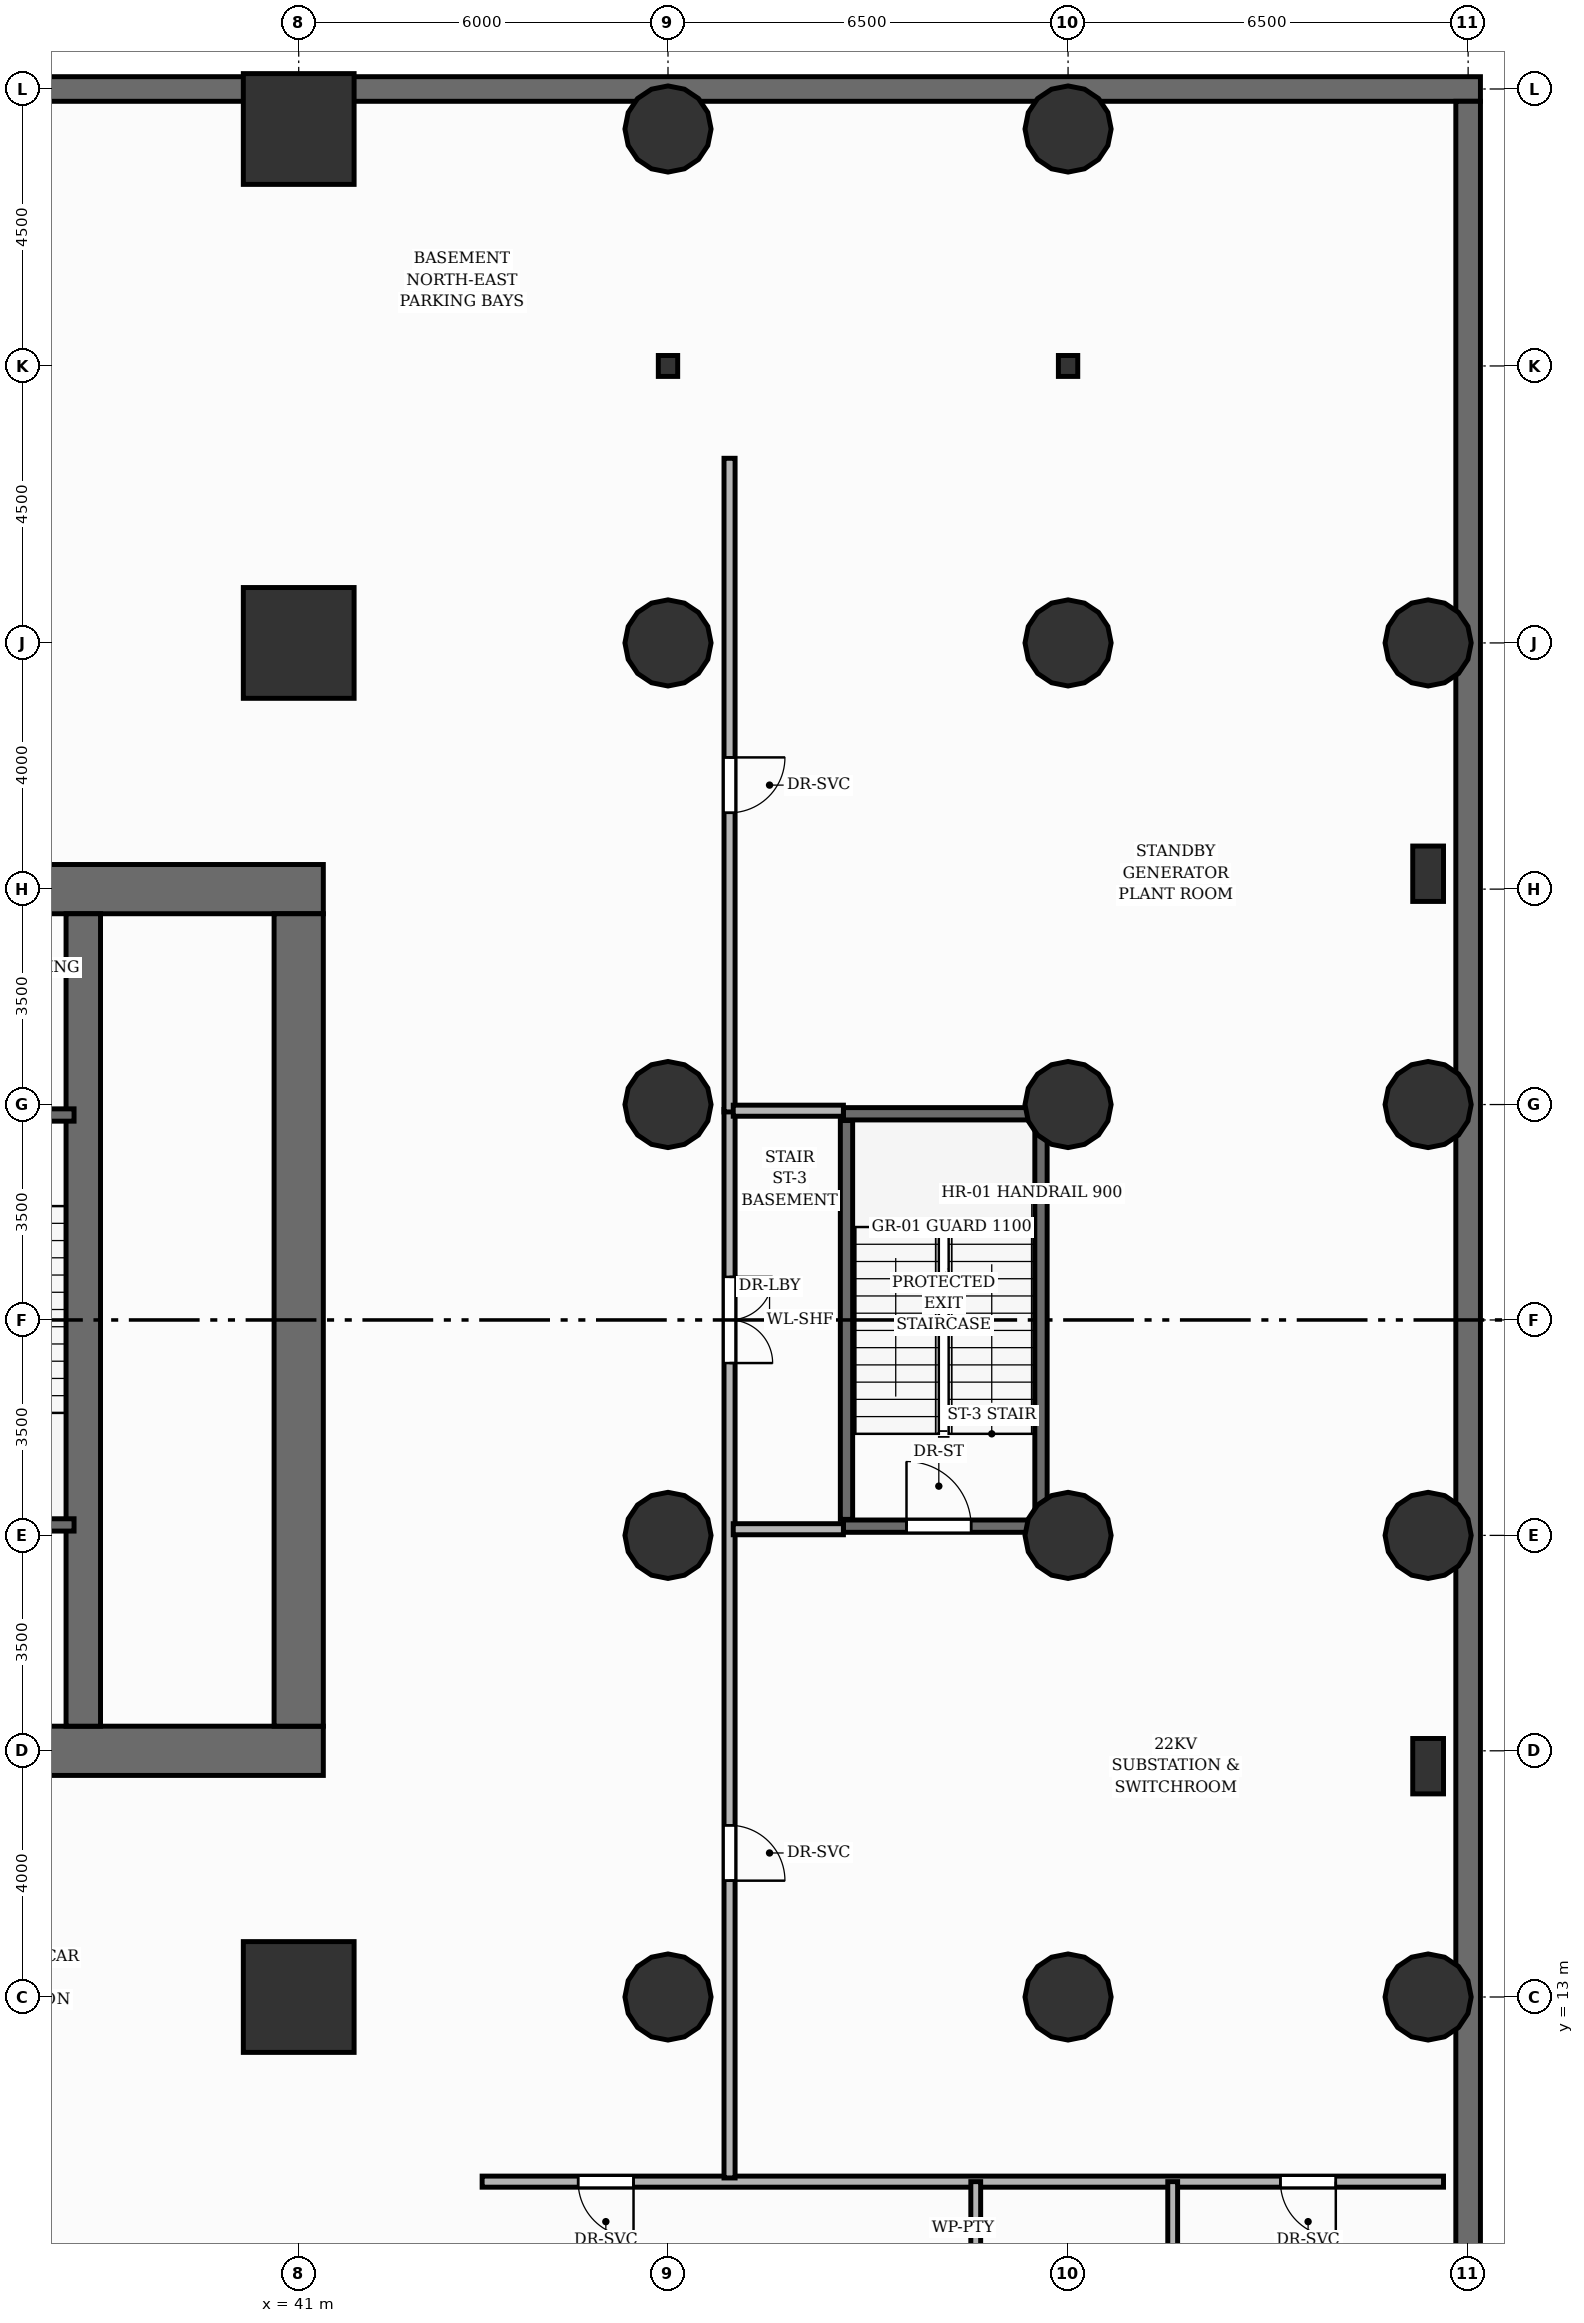
"""IFC4 building model, lengths in metres.
Left out: names, types, materials, properties, quantities, classifications, styles, units other than length and angle.
Written with IfcOpenShell. Run it as: python <this file> out.ifc"""

import sys

from ifc_helpers import new_model, si_unit, direction, frame, frame_2d, origin, origin_2d, place, context, subcontext, project, spatial, rectangle, circle, i_section, extrude, element, fill, save


model = new_model("IFC4")
c1 = context("Model", 3, precision=1e-05, world=origin(), true_north=direction((0.0, 1.0)))
c2 = subcontext(c1, "Body", "Model", "MODEL_VIEW")
j1 = project(units=[si_unit("LENGTHUNIT", "METRE"), si_unit("PLANEANGLEUNIT", "RADIAN")], contexts=[c1])
p1 = place(None, origin())
s1 = spatial("IfcSite", under=j1, at=p1, CompositionType="ELEMENT")
p2 = place(p1, origin())
s2 = spatial("IfcBuilding", under=s1, at=p2, CompositionType="ELEMENT")
p3 = place(p2, frame((0.0, 0.0, -4.5)))
s3 = spatial("IfcBuildingStorey", under=s2, at=p3, CompositionType="ELEMENT", Elevation=-4.5)
p4 = place(p3, frame((3.8, 44.0, 0.0), z_axis=(0.0, 0.0, 1.0), x_axis=(1.0, 0.0, 0.0)))
e1 = element("IfcWall", 1, at=p4, inside=s3, PredefinedType="USERDEFINED", context=c2, shape_type="SweptSolid", body=[
    extrude(rectangle(XDim=56.4, YDim=0.4, at=frame_2d((28.2, 0.0))), origin(), (0.0, 0.0, 1.0), 4.5),
])
p5 = place(p3, frame((60.0, 4.2, 0.0), z_axis=(0.0, 0.0, 1.0), x_axis=(0.0, 1.0, 0.0)))
e2 = element("IfcWall", 2, at=p5, inside=s3, PredefinedType="USERDEFINED", context=c2, shape_type="SweptSolid", body=[
    extrude(rectangle(XDim=39.6, YDim=0.4, at=frame_2d((19.8, 0.0))), origin(), (0.0, 0.0, 1.0), 4.5),
])
p6 = place(p3, frame((22.6, 17.0, 0.0), z_axis=(0.0, 0.0, 1.0), x_axis=(1.0, 0.0, 0.0)))
e3 = element("IfcWall", 3, at=p6, inside=s3, PredefinedType="SHEAR", context=c2, shape_type="SweptSolid", body=[
    extrude(rectangle(XDim=18.8, YDim=0.8, at=frame_2d((9.4, 0.0))), origin(), (0.0, 0.0, 1.0), 4.5),
])
p7 = place(p6, frame((5.9, 0.0, 0.0)))
e4 = element("IfcOpeningElement", 4, at=p7, cuts=e3, PredefinedType="OPENING", context=c2, shape_type="SweptSolid", body=[
    extrude(rectangle(XDim=1.1, YDim=2.15, at=frame_2d((0.55, 1.075))), frame((0.0, 0.41, 0.0), z_axis=(0.0, -1.0, 0.0), x_axis=(1.0, 0.0, 0.0)), (0.0, 0.0, 1.0), 0.82),
])
p8 = place(p3, frame((22.6, 31.0, 0.0), z_axis=(0.0, 0.0, 1.0), x_axis=(1.0, 0.0, 0.0)))
e5 = element("IfcWall", 5, at=p8, inside=s3, PredefinedType="SHEAR", context=c2, shape_type="SweptSolid", body=[
    extrude(rectangle(XDim=18.8, YDim=0.8, at=frame_2d((9.4, 0.0))), origin(), (0.0, 0.0, 1.0), 4.5),
])
p9 = place(p8, frame((11.8, 0.0, 0.0)))
e6 = element("IfcOpeningElement", 6, at=p9, cuts=e5, PredefinedType="OPENING", context=c2, shape_type="SweptSolid", body=[
    extrude(rectangle(XDim=1.1, YDim=2.15, at=frame_2d((0.55, 1.075))), frame((0.0, 0.41, 0.0), z_axis=(0.0, -1.0, 0.0), x_axis=(1.0, 0.0, 0.0)), (0.0, 0.0, 1.0), 0.82),
])
p10 = place(p3, frame((41.0, 17.4, 0.0), z_axis=(0.0, 0.0, 1.0), x_axis=(0.0, 1.0, 0.0)))
e7 = element("IfcWall", 7, at=p10, inside=s3, PredefinedType="SHEAR", context=c2, shape_type="SweptSolid", body=[
    extrude(rectangle(XDim=13.2, YDim=0.8, at=frame_2d((6.6, 0.0))), origin(), (0.0, 0.0, 1.0), 4.5),
])
p11 = place(p3, frame((37.5, 17.4, 0.0), z_axis=(0.0, 0.0, 1.0), x_axis=(0.0, 1.0, 0.0)))
e8 = element("IfcWall", 8, at=p11, inside=s3, PredefinedType="SHEAR", context=c2, shape_type="SweptSolid", body=[
    extrude(rectangle(XDim=13.2, YDim=0.56, at=frame_2d((6.6, 0.0))), origin(), (0.0, 0.0, 1.0), 4.5),
])
for number, where, z_axis, x_axis in (
    (9, (47.0, 13.0, 0.0), (0.0, 0.0, 1.0), (1.0, 0.0, 0.0)),
    (10, (47.0, 20.5, 0.0), (0.0, 0.0, 1.0), (1.0, 0.0, 0.0)),
    (11, (47.0, 27.5, 0.0), (0.0, 0.0, 1.0), (1.0, 0.0, 0.0)),
    (12, (47.0, 35.0, 0.0), (0.0, 0.0, 1.0), (1.0, 0.0, 0.0)),
    (13, (47.0, 43.35, 0.0), (0.0, 0.0, 1.0), (1.0, 0.0, 0.0)),
    (14, (53.5, 13.0, 0.0), (0.0, 0.0, 1.0), (1.0, 0.0, 0.0)),
    (15, (53.5, 20.5, 0.0), (0.0, 0.0, 1.0), (1.0, 0.0, 0.0)),
    (16, (53.5, 27.5, 0.0), (0.0, 0.0, 1.0), (1.0, 0.0, 0.0)),
    (17, (53.5, 35.0, 0.0), (0.0, 0.0, 1.0), (1.0, 0.0, 0.0)),
    (18, (53.5, 43.35, 0.0), (0.0, 0.0, 1.0), (1.0, 0.0, 0.0)),
    (19, (59.35, 13.0, 0.0), (0.0, 0.0, 1.0), (1.0, 0.0, 0.0)),
    (20, (59.35, 20.5, 0.0), (0.0, 0.0, 1.0), (1.0, 0.0, 0.0)),
    (21, (59.35, 27.5, 0.0), (0.0, 0.0, 1.0), (1.0, 0.0, 0.0)),
    (22, (59.35, 35.0, 0.0), (0.0, 0.0, 1.0), (1.0, 0.0, 0.0)),
):
    element("IfcColumn", number, at=place(p3, frame(where, z_axis=z_axis, x_axis=x_axis)), inside=s3, PredefinedType="COLUMN", context=c2, shape_type="SweptSolid", body=[
        extrude(circle(Radius=0.7, at=origin_2d()), origin(), (0.0, 0.0, 1.0), 4.5),
    ])
for number, where, z_axis, x_axis in (
    (23, (41.0, 13.0, 0.0), (0.0, 0.0, 1.0), (1.0, 0.0, 0.0)),
    (24, (41.0, 35.0, 0.0), (0.0, 0.0, 1.0), (1.0, 0.0, 0.0)),
    (25, (41.0, 43.35, 0.0), (0.0, 0.0, 1.0), (1.0, 0.0, 0.0)),
):
    element("IfcColumn", number, at=place(p3, frame(where, z_axis=z_axis, x_axis=x_axis)), inside=s3, PredefinedType="COLUMN", context=c2, shape_type="SweptSolid", body=[
        extrude(rectangle(XDim=1.8, YDim=1.8, at=origin_2d()), origin(), (0.0, 0.0, 1.0), 4.5),
    ])
for number, where, z_axis, x_axis in (
    (26, (47.0, 39.5, 0.0), (0.0, 0.0, 1.0), (1.0, 0.0, 0.0)),
    (27, (53.5, 39.5, 0.0), (0.0, 0.0, 1.0), (1.0, 0.0, 0.0)),
):
    element("IfcColumn", number, at=place(p3, frame(where, z_axis=z_axis, x_axis=x_axis)), inside=s3, PredefinedType="COLUMN", context=c2, shape_type="SweptSolid", body=[
        extrude(i_section(OverallWidth=0.314, OverallDepth=0.34, WebThickness=0.019, FlangeThickness=0.031, at=origin_2d()), origin(), (0.0, 0.0, 1.0), 4.5),
    ])
for number, where, z_axis, x_axis in (
    (28, (59.35, 16.75, 0.0), (0.0, 0.0, 1.0), (1.0, 0.0, 0.0)),
    (29, (59.35, 31.25, 0.0), (0.0, 0.0, 1.0), (1.0, 0.0, 0.0)),
):
    element("IfcColumn", number, at=place(p3, frame(where, z_axis=z_axis, x_axis=x_axis)), inside=s3, PredefinedType="PILASTER", context=c2, shape_type="SweptSolid", body=[
        extrude(rectangle(XDim=0.5, YDim=0.9, at=origin_2d()), origin(), (0.0, 0.0, 1.0), 4.5),
    ])
p12 = place(p3, frame((34.11, 20.67, 0.0), z_axis=(0.0, 0.0, 1.0), x_axis=(1.0, 0.0, 0.0)))
e30 = element("IfcWall", 30, at=p12, inside=s3, PredefinedType="SHEAR", context=c2, shape_type="SweptSolid", body=[
    extrude(rectangle(XDim=3.24, YDim=0.2, at=frame_2d((1.62, 0.0))), origin(), (0.0, 0.0, 1.0), 4.5),
])
p13 = place(p3, frame((34.11, 27.33, 0.0), z_axis=(0.0, 0.0, 1.0), x_axis=(1.0, 0.0, 0.0)))
e31 = element("IfcWall", 31, at=p13, inside=s3, PredefinedType="SHEAR", context=c2, shape_type="SweptSolid", body=[
    extrude(rectangle(XDim=3.24, YDim=0.2, at=frame_2d((1.62, 0.0))), origin(), (0.0, 0.0, 1.0), 4.5),
])
p14 = place(p13, frame((1.135, 0.0, 0.0)))
e32 = element("IfcOpeningElement", 32, at=p14, cuts=e31, PredefinedType="OPENING", context=c2, shape_type="SweptSolid", body=[
    extrude(rectangle(XDim=1.05, YDim=2.15, at=frame_2d((0.525, 1.075))), frame((0.0, 0.11, 0.0), z_axis=(0.0, -1.0, 0.0), x_axis=(1.0, 0.0, 0.0)), (0.0, 0.0, 1.0), 0.22),
])
for number, where, z_axis, x_axis in (
    (33, (49.9, 20.76, 0.0), (0.0, 0.0, 1.0), (0.0, 1.0, 0.0)),
    (34, (53.06, 20.76, 0.0), (0.0, 0.0, 1.0), (0.0, 1.0, 0.0)),
):
    element("IfcWall", number, at=place(p3, frame(where, z_axis=z_axis, x_axis=x_axis)), inside=s3, PredefinedType="SHEAR", context=c2, shape_type="SweptSolid", body=[
        extrude(rectangle(XDim=6.48, YDim=0.2, at=frame_2d((3.24, 0.0))), origin(), (0.0, 0.0, 1.0), 4.5),
    ])
p15 = place(p3, frame((49.85, 20.65, 0.0), z_axis=(0.0, 0.0, 1.0), x_axis=(1.0, 0.0, 0.0)))
e35 = element("IfcWall", 35, at=p15, inside=s3, PredefinedType="SHEAR", context=c2, shape_type="SweptSolid", body=[
    extrude(rectangle(XDim=3.26, YDim=0.2, at=frame_2d((1.63, 0.0))), origin(), (0.0, 0.0, 1.0), 4.5),
])
p16 = place(p15, frame((1.025, 0.0, 0.0)))
e36 = element("IfcOpeningElement", 36, at=p16, cuts=e35, PredefinedType="OPENING", context=c2, shape_type="SweptSolid", body=[
    extrude(rectangle(XDim=1.05, YDim=2.15, at=frame_2d((0.525, 1.075))), frame((0.0, 0.11, 0.0), z_axis=(0.0, -1.0, 0.0), x_axis=(1.0, 0.0, 0.0)), (0.0, 0.0, 1.0), 0.22),
])
p17 = place(p3, frame((49.85, 27.35, 0.0), z_axis=(0.0, 0.0, 1.0), x_axis=(1.0, 0.0, 0.0)))
e37 = element("IfcWall", 37, at=p17, inside=s3, PredefinedType="SHEAR", context=c2, shape_type="SweptSolid", body=[
    extrude(rectangle(XDim=3.26, YDim=0.2, at=frame_2d((1.63, 0.0))), origin(), (0.0, 0.0, 1.0), 4.5),
])
p18 = place(p3, frame((59.6, 10.0, 0.0), z_axis=(0.0, 0.0, 1.0), x_axis=(-1.0, 0.0, 0.0)))
e38 = element("IfcWall", 38, at=p18, inside=s3, PredefinedType="PARTITIONING", context=c2, shape_type="SweptSolid", body=[
    extrude(rectangle(XDim=15.62, YDim=0.18, at=frame_2d((7.81, 0.0))), origin(), (0.0, 0.0, 1.0), 4.145),
])
p19 = place(p18, frame((13.16, 0.0, 0.0)))
e39 = element("IfcOpeningElement", 39, at=p19, cuts=e38, PredefinedType="OPENING", context=c2, shape_type="SweptSolid", body=[
    extrude(rectangle(XDim=0.9, YDim=2.1, at=frame_2d((0.45, 1.05))), frame((0.0, 0.1, 0.0), z_axis=(0.0, -1.0, 0.0), x_axis=(1.0, 0.0, 0.0)), (0.0, 0.0, 1.0), 0.2),
])
p20 = place(p18, frame((1.75, 0.0, 0.0)))
e40 = element("IfcOpeningElement", 40, at=p20, cuts=e38, PredefinedType="OPENING", context=c2, shape_type="SweptSolid", body=[
    extrude(rectangle(XDim=0.9, YDim=2.1, at=frame_2d((0.45, 1.05))), frame((0.0, 0.1, 0.0), z_axis=(0.0, -1.0, 0.0), x_axis=(1.0, 0.0, 0.0)), (0.0, 0.0, 1.0), 0.2),
])
p21 = place(p3, frame((48.0, 27.42, 0.0), z_axis=(0.0, 0.0, 1.0), x_axis=(0.0, -1.0, 0.0)))
e41 = element("IfcWall", 41, at=p21, inside=s3, PredefinedType="PARTITIONING", context=c2, shape_type="SweptSolid", body=[
    extrude(rectangle(XDim=17.36, YDim=0.18, at=frame_2d((8.68, 0.0))), origin(), (0.0, 0.0, 1.0), 4.145),
])
p22 = place(p21, frame((11.63, 0.0, 0.0)))
e42 = element("IfcOpeningElement", 42, at=p22, cuts=e41, PredefinedType="OPENING", context=c2, shape_type="SweptSolid", body=[
    extrude(rectangle(XDim=0.9, YDim=2.1, at=frame_2d((0.45, 1.05))), frame((0.0, 0.1, 0.0), z_axis=(0.0, -1.0, 0.0), x_axis=(1.0, 0.0, 0.0)), (0.0, 0.0, 1.0), 0.2),
])
p23 = place(p21, frame((2.72, 0.0, 0.0)))
e43 = element("IfcOpeningElement", 43, at=p23, cuts=e41, PredefinedType="OPENING", context=c2, shape_type="SweptSolid", body=[
    extrude(rectangle(XDim=1.4, YDim=2.15, at=frame_2d((0.7, 1.075))), frame((0.0, 0.1, 0.0), z_axis=(0.0, -1.0, 0.0), x_axis=(1.0, 0.0, 0.0)), (0.0, 0.0, 1.0), 0.2),
])
p24 = place(p3, frame((48.0, 38.0, 0.0), z_axis=(0.0, 0.0, 1.0), x_axis=(0.0, -1.0, 0.0)))
e44 = element("IfcWall", 44, at=p24, inside=s3, PredefinedType="PARTITIONING", context=c2, shape_type="SweptSolid", body=[
    extrude(rectangle(XDim=10.62, YDim=0.18, at=frame_2d((5.31, 0.0))), origin(), (0.0, 0.0, 1.0), 4.145),
])
p25 = place(p24, frame((4.86, 0.0, 0.0)))
e45 = element("IfcOpeningElement", 45, at=p25, cuts=e44, PredefinedType="OPENING", context=c2, shape_type="SweptSolid", body=[
    extrude(rectangle(XDim=0.9, YDim=2.1, at=frame_2d((0.45, 1.05))), frame((0.0, 0.1, 0.0), z_axis=(0.0, -1.0, 0.0), x_axis=(1.0, 0.0, 0.0)), (0.0, 0.0, 1.0), 0.2),
])
p26 = place(p3, frame((52.0, 10.0, 0.0), z_axis=(0.0, 0.0, 1.0), x_axis=(0.0, -1.0, 0.0)))
e46 = element("IfcWall", 46, at=p26, inside=s3, PredefinedType="PLUMBINGWALL", context=c2, shape_type="SweptSolid", body=[
    extrude(rectangle(XDim=5.6, YDim=0.16, at=frame_2d((2.8, 0.0))), origin(), (0.0, 0.0, 1.0), 4.145),
])
p27 = place(p26, frame((2.35, 0.0, 0.0)))
e47 = element("IfcOpeningElement", 47, at=p27, cuts=e46, PredefinedType="OPENING", context=c2, shape_type="SweptSolid", body=[
    extrude(rectangle(XDim=0.9, YDim=2.1, at=frame_2d((0.45, 1.05))), frame((0.0, 0.09, 0.0), z_axis=(0.0, -1.0, 0.0), x_axis=(1.0, 0.0, 0.0)), (0.0, 0.0, 1.0), 0.18),
])
p28 = place(p3, frame((55.2, 10.0, 0.0), z_axis=(0.0, 0.0, 1.0), x_axis=(0.0, -1.0, 0.0)))
e48 = element("IfcWall", 48, at=p28, inside=s3, PredefinedType="PLUMBINGWALL", context=c2, shape_type="SweptSolid", body=[
    extrude(rectangle(XDim=5.6, YDim=0.16, at=frame_2d((2.8, 0.0))), origin(), (0.0, 0.0, 1.0), 4.145),
])
for number, where, z_axis, x_axis in (
    (49, (48.06, 20.6, 0.0), (0.0, 0.0, 1.0), (1.0, 0.0, 0.0)),
    (50, (49.85, 27.4, 0.0), (0.0, 0.0, 1.0), (-1.0, 0.0, 0.0)),
):
    element("IfcWall", number, at=place(p3, frame(where, z_axis=z_axis, x_axis=x_axis)), inside=s3, PredefinedType="PARTITIONING", context=c2, shape_type="SweptSolid", body=[
        extrude(rectangle(XDim=1.79, YDim=0.18, at=frame_2d((0.895, 0.0))), origin(), (0.0, 0.0, 1.0), 3.594),
    ])
p29 = place(p16, origin())
e51 = element("IfcDoor", 51, at=p29, inside=s3, OperationType="SINGLE_SWING_LEFT", PredefinedType="DOOR", context=c2, shape_type="SweptSolid", body=[
    extrude(rectangle(XDim=1.05, YDim=2.15, at=frame_2d((0.525, 1.075))), frame((0.0, 0.025, 0.0), z_axis=(0.0, -1.0, 0.0), x_axis=(1.0, 0.0, 0.0)), (0.0, 0.0, 1.0), 0.05),
])
fill(e36, e51)
p30 = place(p19, origin())
e52 = element("IfcDoor", 52, at=p30, inside=s3, OperationType="SINGLE_SWING_LEFT", PredefinedType="DOOR", context=c2, shape_type="SweptSolid", body=[
    extrude(rectangle(XDim=0.9, YDim=2.1, at=frame_2d((0.45, 1.05))), frame((0.0, 0.025, 0.0), z_axis=(0.0, -1.0, 0.0), x_axis=(1.0, 0.0, 0.0)), (0.0, 0.0, 1.0), 0.05),
])
fill(e39, e52)
p31 = place(p20, origin())
e53 = element("IfcDoor", 53, at=p31, inside=s3, OperationType="SINGLE_SWING_LEFT", PredefinedType="DOOR", context=c2, shape_type="SweptSolid", body=[
    extrude(rectangle(XDim=0.9, YDim=2.1, at=frame_2d((0.45, 1.05))), frame((0.0, 0.025, 0.0), z_axis=(0.0, -1.0, 0.0), x_axis=(1.0, 0.0, 0.0)), (0.0, 0.0, 1.0), 0.05),
])
fill(e40, e53)
p32 = place(p22, origin())
e54 = element("IfcDoor", 54, at=p32, inside=s3, OperationType="SINGLE_SWING_RIGHT", PredefinedType="DOOR", context=c2, shape_type="SweptSolid", body=[
    extrude(rectangle(XDim=0.9, YDim=2.1, at=frame_2d((0.45, 1.05))), frame((0.0, 0.025, 0.0), z_axis=(0.0, -1.0, 0.0), x_axis=(1.0, 0.0, 0.0)), (0.0, 0.0, 1.0), 0.05),
])
fill(e42, e54)
p33 = place(p25, origin())
e55 = element("IfcDoor", 55, at=p33, inside=s3, OperationType="SINGLE_SWING_LEFT", PredefinedType="DOOR", context=c2, shape_type="SweptSolid", body=[
    extrude(rectangle(XDim=0.9, YDim=2.1, at=frame_2d((0.45, 1.05))), frame((0.0, 0.025, 0.0), z_axis=(0.0, -1.0, 0.0), x_axis=(1.0, 0.0, 0.0)), (0.0, 0.0, 1.0), 0.05),
])
fill(e45, e55)
p34 = place(p23, origin())
e56 = element("IfcDoor", 56, at=p34, inside=s3, OperationType="DOUBLE_DOOR_SINGLE_SWING", PredefinedType="DOOR", context=c2, shape_type="SweptSolid", body=[
    extrude(rectangle(XDim=1.4, YDim=2.15, at=frame_2d((0.7, 1.075))), frame((0.0, 0.025, 0.0), z_axis=(0.0, -1.0, 0.0), x_axis=(1.0, 0.0, 0.0)), (0.0, 0.0, 1.0), 0.05),
])
fill(e43, e56)
save(model, sys.argv[1])
